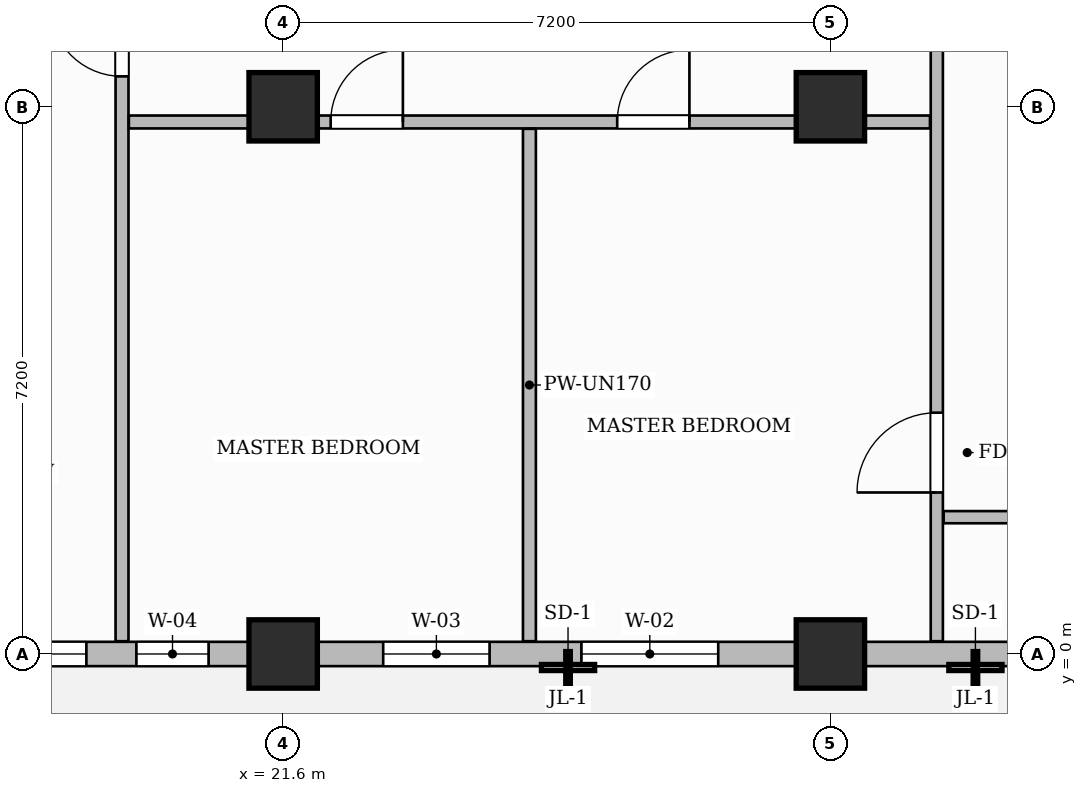
"""IFC4 building model, lengths in metres.
Left out: names, types, materials, properties, quantities, classifications, styles, units other than length and angle.
Written with IfcOpenShell. Run it as: python <this file> out.ifc"""

import sys

from ifc_helpers import new_model, si_unit, direction, frame, frame_2d, origin, origin_2d, place, context, subcontext, project, spatial, rectangle, extrude, source, transform, mapped, element, fill, save


model = new_model("IFC4")
c1 = context("Model", 3, precision=1e-05, world=origin(), true_north=direction((0.0, 1.0)))
c2 = subcontext(c1, "Body", "Model", "MODEL_VIEW")
j1 = project(units=[si_unit("LENGTHUNIT", "METRE"), si_unit("PLANEANGLEUNIT", "RADIAN")], contexts=[c1])
p1 = place(None, origin())
s1 = spatial("IfcSite", under=j1, at=p1, CompositionType="ELEMENT")
p2 = place(p1, origin())
s2 = spatial("IfcBuilding", under=s1, at=p2, CompositionType="ELEMENT")
p3 = place(p2, frame((0.0, 0.0, 217.3)))
s3 = spatial("IfcBuildingStorey", under=s2, at=p3, CompositionType="ELEMENT", Elevation=217.3)
m1 = source(origin(), c2, "Body", "SweptSolid", [
    extrude(rectangle(XDim=0.9, YDim=0.9, at=origin_2d()), origin(), (0.0, 0.0, 1.0), 3.85),
])
for number, where, z_axis, x_axis in (
    (1, (21.6, 0.0, 0.0), (0.0, 0.0, 1.0), (1.0, 0.0, 0.0)),
    (2, (21.6, 7.2, 0.0), (0.0, 0.0, 1.0), (1.0, 0.0, 0.0)),
    (3, (28.8, 0.0, 0.0), (0.0, 0.0, 1.0), (1.0, 0.0, 0.0)),
    (4, (28.8, 7.2, 0.0), (0.0, 0.0, 1.0), (1.0, 0.0, 0.0)),
):
    element("IfcColumn", number, at=place(p3, frame(where, z_axis=z_axis, x_axis=x_axis)), inside=s3, PredefinedType="COLUMN", context=c2, shape_type="MappedRepresentation", body=[
        mapped(m1, transform((0.0, 0.0, 0.0), scale=1.0)),
    ])
p4 = place(p3, frame((30.2, 0.168, 0.0), z_axis=(0.0, 0.0, 1.0), x_axis=(0.0, 1.0, 0.0)))
e5 = element("IfcWall", 5, at=p4, inside=s3, PredefinedType="PARTITIONING", context=c2, shape_type="SweptSolid", body=[
    extrude(rectangle(XDim=8.892, YDim=0.16, at=frame_2d((4.446, 0.0))), origin(), (0.0, 0.0, 1.0), 3.6),
])
p5 = place(p4, frame((1.957, 0.0, 0.0)))
e6 = element("IfcOpeningElement", 6, at=p5, cuts=e5, PredefinedType="OPENING", context=c2, shape_type="SweptSolid", body=[
    extrude(rectangle(XDim=1.05, YDim=2.15, at=frame_2d((0.525, 1.075))), frame((0.0, 0.09, 0.0), z_axis=(0.0, -1.0, 0.0), x_axis=(1.0, 0.0, 0.0)), (0.0, 0.0, 1.0), 0.18),
])
p6 = place(p3, frame((30.29, 1.8, 0.0), z_axis=(0.0, 0.0, 1.0), x_axis=(1.0, 0.0, 0.0)))
e7 = element("IfcWall", 7, at=p6, inside=s3, PredefinedType="PARTITIONING", context=c2, shape_type="SweptSolid", body=[
    extrude(rectangle(XDim=19.37, YDim=0.16, at=frame_2d((9.685, 0.0))), origin(), (0.0, 0.0, 1.0), 3.6),
])
p7 = place(p6, frame((9.735, 0.0, 0.0)))
e8 = element("IfcOpeningElement", 8, at=p7, cuts=e7, PredefinedType="OPENING", context=c2, shape_type="SweptSolid", body=[
    extrude(rectangle(XDim=0.95, YDim=2.15, at=frame_2d((0.475, 1.075))), frame((0.0, 0.09, 0.0), z_axis=(0.0, -1.0, 0.0), x_axis=(1.0, 0.0, 0.0)), (0.0, 0.0, 1.0), 0.18),
])
p8 = place(p3, frame((19.48, 0.168, 0.0), z_axis=(0.0, 0.0, 1.0), x_axis=(0.0, 1.0, 0.0)))
e9 = element("IfcWall", 9, at=p8, inside=s3, PredefinedType="PARTITIONING", context=c2, shape_type="SweptSolid", body=[
    extrude(rectangle(XDim=8.892, YDim=0.17, at=frame_2d((4.446, 0.0))), origin(), (0.0, 0.0, 1.0), 3.6),
])
p9 = place(p8, frame((7.432, 0.0, 0.0)))
e10 = element("IfcOpeningElement", 10, at=p9, cuts=e9, PredefinedType="OPENING", context=c2, shape_type="SweptSolid", body=[
    extrude(rectangle(XDim=0.95, YDim=2.15, at=frame_2d((0.475, 1.075))), frame((0.0, 0.095, 0.0), z_axis=(0.0, -1.0, 0.0), x_axis=(1.0, 0.0, 0.0)), (0.0, 0.0, 1.0), 0.19),
])
p10 = place(p3, frame((19.57, 7.0, 0.0), z_axis=(0.0, 0.0, 1.0), x_axis=(1.0, 0.0, 0.0)))
e11 = element("IfcWall", 11, at=p10, inside=s3, PredefinedType="PARTITIONING", context=c2, shape_type="SweptSolid", body=[
    extrude(rectangle(XDim=10.54, YDim=0.17, at=frame_2d((5.27, 0.0))), origin(), (0.0, 0.0, 1.0), 3.135),
])
p11 = place(p10, frame((2.655, 0.0, 0.0)))
e12 = element("IfcOpeningElement", 12, at=p11, cuts=e11, PredefinedType="OPENING", context=c2, shape_type="SweptSolid", body=[
    extrude(rectangle(XDim=0.95, YDim=2.15, at=frame_2d((0.475, 1.075))), frame((0.0, 0.095, 0.0), z_axis=(0.0, -1.0, 0.0), x_axis=(1.0, 0.0, 0.0)), (0.0, 0.0, 1.0), 0.19),
])
p12 = place(p10, frame((6.425, 0.0, 0.0)))
e13 = element("IfcOpeningElement", 13, at=p12, cuts=e11, PredefinedType="OPENING", context=c2, shape_type="SweptSolid", body=[
    extrude(rectangle(XDim=0.95, YDim=2.15, at=frame_2d((0.475, 1.075))), frame((0.0, 0.095, 0.0), z_axis=(0.0, -1.0, 0.0), x_axis=(1.0, 0.0, 0.0)), (0.0, 0.0, 1.0), 0.19),
])
p13 = place(p3, frame((24.84, 0.168, 0.0), z_axis=(0.0, 0.0, 1.0), x_axis=(0.0, 1.0, 0.0)))
e14 = element("IfcWall", 14, at=p13, inside=s3, PredefinedType="PARTITIONING", context=c2, shape_type="SweptSolid", body=[
    extrude(rectangle(XDim=6.742, YDim=0.17, at=frame_2d((3.371, 0.0))), origin(), (0.0, 0.0, 1.0), 3.6),
])
p14 = place(p3, frame((14.4, 0.0, 0.0), z_axis=(0.0, 0.0, 1.0), x_axis=(1.0, 0.0, 0.0)))
e15 = element("IfcWall", 15, at=p14, inside=s3, PredefinedType="SOLIDWALL", context=c2, shape_type="SweptSolid", body=[
    extrude(rectangle(XDim=35.4, YDim=0.32, at=frame_2d((17.7, 0.0))), origin(), (0.0, 0.0, 1.0), 3.135),
])
p15 = place(p14, frame((0.85, 0.0, 0.0)))
e16 = element("IfcOpeningElement", 16, at=p15, cuts=e15, PredefinedType="OPENING", context=c2, shape_type="SweptSolid", body=[
    extrude(rectangle(XDim=1.2, YDim=2.2, at=frame_2d((0.6, 1.1))), frame((0.0, 0.17, 0.0), z_axis=(0.0, -1.0, 0.0), x_axis=(1.0, 0.0, 0.0)), (0.0, 0.0, 1.0), 0.34),
])
p16 = place(p14, frame((2.811, 0.0, 0.8)))
e17 = element("IfcOpeningElement", 17, at=p16, cuts=e15, PredefinedType="OPENING", context=c2, shape_type="SweptSolid", body=[
    extrude(rectangle(XDim=1.8, YDim=1.85, at=frame_2d((0.9, 0.925))), frame((0.0, 0.17, 0.0), z_axis=(0.0, -1.0, 0.0), x_axis=(1.0, 0.0, 0.0)), (0.0, 0.0, 1.0), 0.34),
])
p17 = place(p14, frame((5.269, 0.0, 0.8)))
e18 = element("IfcOpeningElement", 18, at=p17, cuts=e15, PredefinedType="OPENING", context=c2, shape_type="SweptSolid", body=[
    extrude(rectangle(XDim=0.95, YDim=1.75, at=frame_2d((0.475, 0.875))), frame((0.0, 0.17, 0.0), z_axis=(0.0, -1.0, 0.0), x_axis=(1.0, 0.0, 0.0)), (0.0, 0.0, 1.0), 0.34),
])
p18 = place(p14, frame((8.516, 0.0, 0.8)))
e19 = element("IfcOpeningElement", 19, at=p18, cuts=e15, PredefinedType="OPENING", context=c2, shape_type="SweptSolid", body=[
    extrude(rectangle(XDim=1.4, YDim=1.85, at=frame_2d((0.7, 0.925))), frame((0.0, 0.17, 0.0), z_axis=(0.0, -1.0, 0.0), x_axis=(1.0, 0.0, 0.0)), (0.0, 0.0, 1.0), 0.34),
])
p19 = place(p14, frame((11.124, 0.0, 0.8)))
e20 = element("IfcOpeningElement", 20, at=p19, cuts=e15, PredefinedType="OPENING", context=c2, shape_type="SweptSolid", body=[
    extrude(rectangle(XDim=1.8, YDim=1.85, at=frame_2d((0.9, 0.925))), frame((0.0, 0.17, 0.0), z_axis=(0.0, -1.0, 0.0), x_axis=(1.0, 0.0, 0.0)), (0.0, 0.0, 1.0), 0.34),
])
p20 = place(p14, frame((16.804, 0.0, 0.8)))
e21 = element("IfcOpeningElement", 21, at=p20, cuts=e15, PredefinedType="OPENING", context=c2, shape_type="SweptSolid", body=[
    extrude(rectangle(XDim=1.8, YDim=1.85, at=frame_2d((0.9, 0.925))), frame((0.0, 0.17, 0.0), z_axis=(0.0, -1.0, 0.0), x_axis=(1.0, 0.0, 0.0)), (0.0, 0.0, 1.0), 0.34),
])
p21 = place(p14, frame((21.725, 0.0, 0.8)))
e22 = element("IfcOpeningElement", 22, at=p21, cuts=e15, PredefinedType="OPENING", context=c2, shape_type="SweptSolid", body=[
    extrude(rectangle(XDim=1.8, YDim=1.85, at=frame_2d((0.9, 0.925))), frame((0.0, 0.17, 0.0), z_axis=(0.0, -1.0, 0.0), x_axis=(1.0, 0.0, 0.0)), (0.0, 0.0, 1.0), 0.34),
])
p22 = place(p14, frame((24.475, 0.0, 0.8)))
e23 = element("IfcOpeningElement", 23, at=p22, cuts=e15, PredefinedType="OPENING", context=c2, shape_type="SweptSolid", body=[
    extrude(rectangle(XDim=1.8, YDim=1.85, at=frame_2d((0.9, 0.925))), frame((0.0, 0.17, 0.0), z_axis=(0.0, -1.0, 0.0), x_axis=(1.0, 0.0, 0.0)), (0.0, 0.0, 1.0), 0.34),
])
p23 = place(p14, frame((29.075, 0.0, 0.8)))
e24 = element("IfcOpeningElement", 24, at=p23, cuts=e15, PredefinedType="OPENING", context=c2, shape_type="SweptSolid", body=[
    extrude(rectangle(XDim=1.8, YDim=1.85, at=frame_2d((0.9, 0.925))), frame((0.0, 0.17, 0.0), z_axis=(0.0, -1.0, 0.0), x_axis=(1.0, 0.0, 0.0)), (0.0, 0.0, 1.0), 0.34),
])
p24 = place(p14, frame((32.125, 0.0, 0.8)))
e25 = element("IfcOpeningElement", 25, at=p24, cuts=e15, PredefinedType="OPENING", context=c2, shape_type="SweptSolid", body=[
    extrude(rectangle(XDim=1.8, YDim=1.85, at=frame_2d((0.9, 0.925))), frame((0.0, 0.17, 0.0), z_axis=(0.0, -1.0, 0.0), x_axis=(1.0, 0.0, 0.0)), (0.0, 0.0, 1.0), 0.34),
])
m2 = source(origin(), c2, "Body", "SweptSolid", [
    extrude(rectangle(XDim=1.05, YDim=2.15, at=frame_2d((0.525, 1.075))), frame((0.0, 0.025, 0.0), z_axis=(0.0, -1.0, 0.0), x_axis=(1.0, 0.0, 0.0)), (0.0, 0.0, 1.0), 0.05),
])
p25 = place(p5, origin())
e26 = element("IfcDoor", 26, at=p25, inside=s3, OperationType="SINGLE_SWING_LEFT", PredefinedType="DOOR", context=c2, shape_type="MappedRepresentation", body=[
    mapped(m2, transform((0.0, 0.0, 0.0), scale=1.0)),
])
fill(e6, e26)
m3 = source(origin(), c2, "Body", "SweptSolid", [
    extrude(rectangle(XDim=0.95, YDim=2.15, at=frame_2d((0.475, 1.075))), frame((0.0, 0.025, 0.0), z_axis=(0.0, -1.0, 0.0), x_axis=(1.0, 0.0, 0.0)), (0.0, 0.0, 1.0), 0.05),
])
p26 = place(p9, origin())
e27 = element("IfcDoor", 27, at=p26, inside=s3, OperationType="SINGLE_SWING_RIGHT", PredefinedType="DOOR", context=c2, shape_type="MappedRepresentation", body=[
    mapped(m3, transform((0.0, 0.0, 0.0), scale=1.0)),
])
fill(e10, e27)
p27 = place(p11, origin())
e28 = element("IfcDoor", 28, at=p27, inside=s3, OperationType="SINGLE_SWING_RIGHT", PredefinedType="DOOR", context=c2, shape_type="MappedRepresentation", body=[
    mapped(m3, transform((0.0, 0.0, 0.0), scale=1.0)),
])
fill(e12, e28)
p28 = place(p12, origin())
e29 = element("IfcDoor", 29, at=p28, inside=s3, OperationType="SINGLE_SWING_RIGHT", PredefinedType="DOOR", context=c2, shape_type="MappedRepresentation", body=[
    mapped(m3, transform((0.0, 0.0, 0.0), scale=1.0)),
])
fill(e13, e29)
m4 = source(origin(), c2, "Body", "SweptSolid", [
    extrude(rectangle(XDim=1.8, YDim=1.85, at=frame_2d((0.9, 0.925))), frame((0.0, 0.03, 0.0), z_axis=(0.0, -1.0, 0.0), x_axis=(1.0, 0.0, 0.0)), (0.0, 0.0, 1.0), 0.06),
])
p29 = place(p16, origin())
e30 = element("IfcWindow", 30, at=p29, inside=s3, PartitioningType="DOUBLE_PANEL_VERTICAL", PredefinedType="WINDOW", context=c2, shape_type="MappedRepresentation", body=[
    mapped(m4, transform((0.0, 0.0, 0.0), scale=1.0)),
])
fill(e17, e30)
m5 = source(origin(), c2, "Body", "SweptSolid", [
    extrude(rectangle(XDim=0.95, YDim=1.75, at=frame_2d((0.475, 0.875))), frame((0.0, 0.03, 0.0), z_axis=(0.0, -1.0, 0.0), x_axis=(1.0, 0.0, 0.0)), (0.0, 0.0, 1.0), 0.06),
])
p30 = place(p17, origin())
e31 = element("IfcWindow", 31, at=p30, inside=s3, PartitioningType="SINGLE_PANEL", PredefinedType="WINDOW", context=c2, shape_type="MappedRepresentation", body=[
    mapped(m5, transform((0.0, 0.0, 0.0), scale=1.0)),
])
fill(e18, e31)
m6 = source(origin(), c2, "Body", "SweptSolid", [
    extrude(rectangle(XDim=1.4, YDim=1.85, at=frame_2d((0.7, 0.925))), frame((0.0, 0.03, 0.0), z_axis=(0.0, -1.0, 0.0), x_axis=(1.0, 0.0, 0.0)), (0.0, 0.0, 1.0), 0.06),
])
p31 = place(p18, origin())
e32 = element("IfcWindow", 32, at=p31, inside=s3, PartitioningType="SINGLE_PANEL", PredefinedType="WINDOW", context=c2, shape_type="MappedRepresentation", body=[
    mapped(m6, transform((0.0, 0.0, 0.0), scale=1.0)),
])
fill(e19, e32)
p32 = place(p19, origin())
e33 = element("IfcWindow", 33, at=p32, inside=s3, PartitioningType="DOUBLE_PANEL_VERTICAL", PredefinedType="WINDOW", context=c2, shape_type="MappedRepresentation", body=[
    mapped(m4, transform((0.0, 0.0, 0.0), scale=1.0)),
])
fill(e20, e33)
save(model, sys.argv[1])
